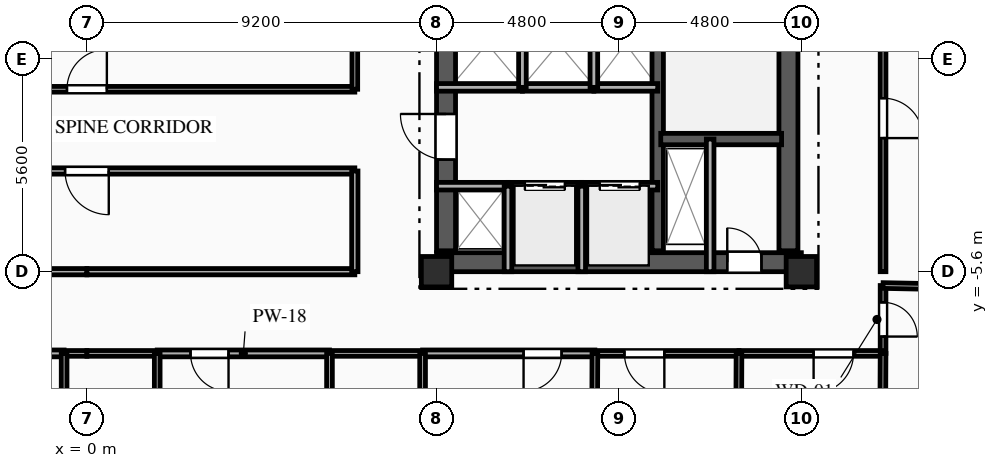
"""IFC4 building model, lengths in metres.
Left out: names, types, materials, properties, quantities, classifications, styles, units other than length and angle.
Written with IfcOpenShell. Run it as: python <this file> out.ifc"""

import sys

from ifc_helpers import new_model, si_unit, direction, frame, frame_2d, origin, origin_2d, place, context, subcontext, project, spatial, rectangle, extrude, element, fill, save


model = new_model("IFC4")
c1 = context("Model", 3, precision=1e-05, world=origin(), true_north=direction((0.0, 1.0)))
c2 = subcontext(c1, "Body", "Model", "MODEL_VIEW")
j1 = project(units=[si_unit("LENGTHUNIT", "METRE"), si_unit("PLANEANGLEUNIT", "RADIAN")], contexts=[c1])
p1 = place(None, origin())
s1 = spatial("IfcSite", under=j1, at=p1, CompositionType="ELEMENT")
p2 = place(p1, origin())
s2 = spatial("IfcBuilding", under=s1, at=p2, CompositionType="ELEMENT")
p3 = place(p2, frame((0.0, 0.0, 209.8)))
s3 = spatial("IfcBuildingStorey", under=s2, at=p3, CompositionType="ELEMENT", Elevation=209.8)
for number, where, z_axis, x_axis in (
    (1, (9.2, -5.6, 0.0), (0.0, 0.0, 1.0), (1.0, 0.0, 0.0)),
    (2, (18.8, -5.6, 0.0), (0.0, 0.0, 1.0), (1.0, 0.0, 0.0)),
):
    element("IfcColumn", number, at=place(p3, frame(where, z_axis=z_axis, x_axis=x_axis)), inside=s3, PredefinedType="COLUMN", context=c2, shape_type="SweptSolid", body=[
        extrude(rectangle(XDim=0.8, YDim=0.8, at=origin_2d()), origin(), (0.0, 0.0, 1.0), 3.35),
    ])
p4 = place(p3, frame((9.2, -5.35, 0.0), z_axis=(0.0, 0.0, 1.0), x_axis=(1.0, 0.0, 0.0)))
e3 = element("IfcWall", 3, at=p4, inside=s3, PredefinedType="SHEAR", context=c2, shape_type="SweptSolid", body=[
    extrude(rectangle(XDim=9.6, YDim=0.5, at=frame_2d((4.8, 0.0))), origin(), (0.0, 0.0, 1.0), 3.04),
])
p5 = place(p4, frame((7.65, 0.0, 0.0)))
e4 = element("IfcOpeningElement", 4, at=p5, cuts=e3, PredefinedType="OPENING", context=c2, shape_type="SweptSolid", body=[
    extrude(rectangle(XDim=0.9, YDim=2.1, at=frame_2d((0.45, 1.05))), frame((0.0, 0.26, 0.0), z_axis=(0.0, -1.0, 0.0), x_axis=(1.0, 0.0, 0.0)), (0.0, 0.0, 1.0), 0.52),
])
p6 = place(p3, frame((9.45, -5.05, 0.0), z_axis=(0.0, 0.0, 1.0), x_axis=(0.0, 1.0, 0.0)))
e5 = element("IfcWall", 5, at=p6, inside=s3, PredefinedType="SHEAR", context=c2, shape_type="SweptSolid", body=[
    extrude(rectangle(XDim=10.1, YDim=0.5, at=frame_2d((5.05, 0.0))), origin(), (0.0, 0.0, 1.0), 3.04),
])
p7 = place(p6, frame((7.15, 0.0, 0.0)))
e6 = element("IfcOpeningElement", 6, at=p7, cuts=e5, PredefinedType="OPENING", context=c2, shape_type="SweptSolid", body=[
    extrude(rectangle(XDim=0.9, YDim=2.1, at=frame_2d((0.45, 1.05))), frame((0.0, 0.26, 0.0), z_axis=(0.0, -1.0, 0.0), x_axis=(1.0, 0.0, 0.0)), (0.0, 0.0, 1.0), 0.52),
])
p8 = place(p6, frame((2.4, 0.0, 0.0)))
e7 = element("IfcOpeningElement", 7, at=p8, cuts=e5, PredefinedType="OPENING", context=c2, shape_type="SweptSolid", body=[
    extrude(rectangle(XDim=1.2, YDim=2.15, at=frame_2d((0.6, 1.075))), frame((0.0, 0.26, 0.0), z_axis=(0.0, -1.0, 0.0), x_axis=(1.0, 0.0, 0.0)), (0.0, 0.0, 1.0), 0.52),
])
p9 = place(p3, frame((18.46, -5.05, 0.0), z_axis=(0.0, 0.0, 1.0), x_axis=(0.0, 1.0, 0.0)))
e8 = element("IfcWall", 8, at=p9, inside=s3, PredefinedType="SHEAR", context=c2, shape_type="SweptSolid", body=[
    extrude(rectangle(XDim=10.1, YDim=0.5, at=frame_2d((5.05, 0.0))), origin(), (0.0, 0.0, 1.0), 3.04),
])
p10 = place(p3, frame((15.02, -5.05, 0.0), z_axis=(0.0, 0.0, 1.0), x_axis=(0.0, 1.0, 0.0)))
e9 = element("IfcWall", 9, at=p10, inside=s3, PredefinedType="SHEAR", context=c2, shape_type="SweptSolid", body=[
    extrude(rectangle(XDim=10.1, YDim=0.3, at=frame_2d((5.05, 0.0))), origin(), (0.0, 0.0, 1.0), 3.04),
])
p11 = place(p3, frame((15.1, -2.11, 0.0), z_axis=(0.0, 0.0, 1.0), x_axis=(1.0, 0.0, 0.0)))
e10 = element("IfcWall", 10, at=p11, inside=s3, PredefinedType="SHEAR", context=c2, shape_type="SweptSolid", body=[
    extrude(rectangle(XDim=3.18, YDim=0.3, at=frame_2d((1.59, 0.0))), origin(), (0.0, 0.0, 1.0), 3.04),
])
p12 = place(p3, frame((16.4, -2.11, 0.0), z_axis=(0.0, 0.0, 1.0), x_axis=(0.0, -1.0, 0.0)))
e11 = element("IfcWall", 11, at=p12, inside=s3, PredefinedType="PARTITIONING", context=c2, shape_type="SweptSolid", body=[
    extrude(rectangle(XDim=3.49, YDim=0.2, at=frame_2d((1.745, 0.0))), origin(), (0.0, 0.0, 1.0), 3.04),
])
p13 = place(p3, frame((9.2, -3.35, 0.0), z_axis=(0.0, 0.0, 1.0), x_axis=(1.0, 0.0, 0.0)))
e12 = element("IfcWall", 12, at=p13, inside=s3, PredefinedType="PARTITIONING", context=c2, shape_type="SweptSolid", body=[
    extrude(rectangle(XDim=1.88, YDim=0.2, at=frame_2d((0.94, 0.0))), origin(), (0.0, 0.0, 1.0), 2.755),
])
p14 = place(p3, frame((11.08, -3.35, 0.0), z_axis=(0.0, 0.0, 1.0), x_axis=(1.0, 0.0, 0.0)))
e13 = element("IfcWall", 13, at=p14, inside=s3, PredefinedType="PARTITIONING", context=c2, shape_type="SweptSolid", body=[
    extrude(rectangle(XDim=1.94, YDim=0.2, at=frame_2d((0.97, 0.0))), origin(), (0.0, 0.0, 1.0), 3.04),
])
p15 = place(p14, frame((0.445, 0.0, 0.0)))
e14 = element("IfcOpeningElement", 14, at=p15, cuts=e13, PredefinedType="OPENING", context=c2, shape_type="SweptSolid", body=[
    extrude(rectangle(XDim=1.05, YDim=2.1, at=frame_2d((0.525, 1.05))), frame((0.0, 0.11, 0.0), z_axis=(0.0, -1.0, 0.0), x_axis=(1.0, 0.0, 0.0)), (0.0, 0.0, 1.0), 0.22),
])
p16 = place(p3, frame((13.02, -3.35, 0.0), z_axis=(0.0, 0.0, 1.0), x_axis=(1.0, 0.0, 0.0)))
e15 = element("IfcWall", 15, at=p16, inside=s3, PredefinedType="PARTITIONING", context=c2, shape_type="SweptSolid", body=[
    extrude(rectangle(XDim=2.0, YDim=0.2, at=frame_2d((1.0, 0.0))), origin(), (0.0, 0.0, 1.0), 3.04),
])
p17 = place(p16, frame((0.475, 0.0, 0.0)))
e16 = element("IfcOpeningElement", 16, at=p17, cuts=e15, PredefinedType="OPENING", context=c2, shape_type="SweptSolid", body=[
    extrude(rectangle(XDim=1.05, YDim=2.1, at=frame_2d((0.525, 1.05))), frame((0.0, 0.11, 0.0), z_axis=(0.0, -1.0, 0.0), x_axis=(1.0, 0.0, 0.0)), (0.0, 0.0, 1.0), 0.22),
])
p18 = place(p3, frame((11.46, -0.75, 0.0), z_axis=(0.0, 0.0, 1.0), x_axis=(-1.0, 0.0, 0.0)))
e17 = element("IfcWall", 17, at=p18, inside=s3, PredefinedType="PARTITIONING", context=c2, shape_type="SweptSolid", body=[
    extrude(rectangle(XDim=2.26, YDim=0.2, at=frame_2d((1.13, 0.0))), origin(), (0.0, 0.0, 1.0), 3.04),
])
p19 = place(p3, frame((13.34, -0.75, 0.0), z_axis=(0.0, 0.0, 1.0), x_axis=(-1.0, 0.0, 0.0)))
e18 = element("IfcWall", 18, at=p19, inside=s3, PredefinedType="PARTITIONING", context=c2, shape_type="SweptSolid", body=[
    extrude(rectangle(XDim=1.88, YDim=0.2, at=frame_2d((0.94, 0.0))), origin(), (0.0, 0.0, 1.0), 3.04),
])
p20 = place(p3, frame((15.02, -0.75, 0.0), z_axis=(0.0, 0.0, 1.0), x_axis=(-1.0, 0.0, 0.0)))
e19 = element("IfcWall", 19, at=p20, inside=s3, PredefinedType="PARTITIONING", context=c2, shape_type="SweptSolid", body=[
    extrude(rectangle(XDim=1.68, YDim=0.2, at=frame_2d((0.84, 0.0))), origin(), (0.0, 0.0, 1.0), 3.04),
])
for number, where, z_axis, x_axis in (
    (20, (11.08, -5.6, 0.0), (0.0, 0.0, 1.0), (0.0, 1.0, 0.0)),
    (21, (13.02, -5.6, 0.0), (0.0, 0.0, 1.0), (0.0, 1.0, 0.0)),
):
    element("IfcWall", number, at=place(p3, frame(where, z_axis=z_axis, x_axis=x_axis)), inside=s3, PredefinedType="PARTITIONING", context=c2, shape_type="SweptSolid", body=[
        extrude(rectangle(XDim=2.25, YDim=0.2, at=frame_2d((1.125, 0.0))), origin(), (0.0, 0.0, 1.0), 3.04),
    ])
for number, where, z_axis, x_axis in (
    (22, (11.46, -0.75, 0.0), (0.0, 0.0, 1.0), (0.0, 1.0, 0.0)),
    (23, (13.34, -0.75, 0.0), (0.0, 0.0, 1.0), (0.0, 1.0, 0.0)),
):
    element("IfcWall", number, at=place(p3, frame(where, z_axis=z_axis, x_axis=x_axis)), inside=s3, PredefinedType="PARTITIONING", context=c2, shape_type="SweptSolid", body=[
        extrude(rectangle(XDim=2.3, YDim=0.2, at=frame_2d((1.15, 0.0))), origin(), (0.0, 0.0, 1.0), 3.04),
    ])
p21 = place(p3, frame((-0.6, -7.75, 0.0), z_axis=(0.0, 0.0, 1.0), x_axis=(-1.0, 0.0, 0.0)))
e24 = element("IfcWall", 24, at=p21, inside=s3, PredefinedType="PARTITIONING", context=c2, shape_type="SweptSolid", body=[
    extrude(rectangle(XDim=4.533, YDim=0.18, at=frame_2d((2.267, 0.0))), origin(), (0.0, 0.0, 1.0), 3.04),
])
p22 = place(p21, frame((0.877, 0.0, 0.0)))
e25 = element("IfcOpeningElement", 25, at=p22, cuts=e24, PredefinedType="OPENING", context=c2, shape_type="SweptSolid", body=[
    extrude(rectangle(XDim=1.0, YDim=2.15, at=frame_2d((0.5, 1.075))), frame((0.0, 0.1, 0.0), z_axis=(0.0, -1.0, 0.0), x_axis=(1.0, 0.0, 0.0)), (0.0, 0.0, 1.0), 0.2),
])
p23 = place(p3, frame((0.0, -7.75, 0.0), z_axis=(0.0, 0.0, 1.0), x_axis=(-1.0, 0.0, 0.0)))
e26 = element("IfcWall", 26, at=p23, inside=s3, PredefinedType="PLUMBINGWALL", context=c2, shape_type="SweptSolid", body=[
    extrude(rectangle(XDim=0.6, YDim=0.15, at=frame_2d((0.3, 0.0))), origin(), (0.0, 0.0, 1.0), 3.04),
])
p24 = place(p3, frame((-7.05, -5.6, 0.0), z_axis=(0.0, 0.0, 1.0), x_axis=(1.0, 0.0, 0.0)))
e27 = element("IfcWall", 27, at=p24, inside=s3, PredefinedType="PARTITIONING", context=c2, shape_type="SweptSolid", body=[
    extrude(rectangle(XDim=7.05, YDim=0.165, at=frame_2d((3.525, 0.0))), origin(), (0.0, 0.0, 1.0), 2.525),
])
p25 = place(p3, frame((20.95, -5.964, 0.0), z_axis=(0.0, 0.0, 1.0), x_axis=(0.0, -1.0, 0.0)))
e28 = element("IfcWall", 28, at=p25, inside=s3, PredefinedType="PARTITIONING", context=c2, shape_type="SweptSolid", body=[
    extrude(rectangle(XDim=1.786, YDim=0.15, at=frame_2d((0.893, 0.0))), origin(), (0.0, 0.0, 1.0), 3.04),
])
p26 = place(p25, frame((0.443, 0.0, 0.0)))
e29 = element("IfcOpeningElement", 29, at=p26, cuts=e28, PredefinedType="OPENING", context=c2, shape_type="SweptSolid", body=[
    extrude(rectangle(XDim=0.9, YDim=2.1, at=frame_2d((0.45, 1.05))), frame((0.0, 0.085, 0.0), z_axis=(0.0, -1.0, 0.0), x_axis=(1.0, 0.0, 0.0)), (0.0, 0.0, 1.0), 0.17),
])
p27 = place(p3, frame((6.383, -7.75, 0.0), z_axis=(0.0, 0.0, 1.0), x_axis=(-1.0, 0.0, 0.0)))
e30 = element("IfcWall", 30, at=p27, inside=s3, PredefinedType="PARTITIONING", context=c2, shape_type="SweptSolid", body=[
    extrude(rectangle(XDim=4.533, YDim=0.18, at=frame_2d((2.267, 0.0))), origin(), (0.0, 0.0, 1.0), 3.04),
])
p28 = place(p27, frame((2.656, 0.0, 0.0)))
e31 = element("IfcOpeningElement", 31, at=p28, cuts=e30, PredefinedType="OPENING", context=c2, shape_type="SweptSolid", body=[
    extrude(rectangle(XDim=1.0, YDim=2.15, at=frame_2d((0.5, 1.075))), frame((0.0, 0.1, 0.0), z_axis=(0.0, -1.0, 0.0), x_axis=(1.0, 0.0, 0.0)), (0.0, 0.0, 1.0), 0.2),
])
p29 = place(p3, frame((1.85, -7.75, 0.0), z_axis=(0.0, 0.0, 1.0), x_axis=(-1.0, 0.0, 0.0)))
e32 = element("IfcWall", 32, at=p29, inside=s3, PredefinedType="PLUMBINGWALL", context=c2, shape_type="SweptSolid", body=[
    extrude(rectangle(XDim=1.85, YDim=0.15, at=frame_2d((0.925, 0.0))), origin(), (0.0, 0.0, 1.0), 3.04),
])
p30 = place(p3, frame((13.367, -7.75, 0.0), z_axis=(0.0, 0.0, 1.0), x_axis=(-1.0, 0.0, 0.0)))
e33 = element("IfcWall", 33, at=p30, inside=s3, PredefinedType="PARTITIONING", context=c2, shape_type="SweptSolid", body=[
    extrude(rectangle(XDim=4.534, YDim=0.18, at=frame_2d((2.267, 0.0))), origin(), (0.0, 0.0, 1.0), 3.04),
])
p31 = place(p30, frame((0.877, 0.0, 0.0)))
e34 = element("IfcOpeningElement", 34, at=p31, cuts=e33, PredefinedType="OPENING", context=c2, shape_type="SweptSolid", body=[
    extrude(rectangle(XDim=1.0, YDim=2.15, at=frame_2d((0.5, 1.075))), frame((0.0, 0.1, 0.0), z_axis=(0.0, -1.0, 0.0), x_axis=(1.0, 0.0, 0.0)), (0.0, 0.0, 1.0), 0.2),
])
p32 = place(p3, frame((8.833, -7.75, 0.0), z_axis=(0.0, 0.0, 1.0), x_axis=(-1.0, 0.0, 0.0)))
e35 = element("IfcWall", 35, at=p32, inside=s3, PredefinedType="PLUMBINGWALL", context=c2, shape_type="SweptSolid", body=[
    extrude(rectangle(XDim=2.45, YDim=0.15, at=frame_2d((1.225, 0.0))), origin(), (0.0, 0.0, 1.0), 3.04),
])
p33 = place(p3, frame((17.158, -7.75, 0.0), z_axis=(0.0, 0.0, 1.0), x_axis=(-1.0, 0.0, 0.0)))
e36 = element("IfcWall", 36, at=p33, inside=s3, PredefinedType="PARTITIONING", context=c2, shape_type="SweptSolid", body=[
    extrude(rectangle(XDim=3.792, YDim=0.15, at=frame_2d((1.896, 0.0))), origin(), (0.0, 0.0, 1.0), 3.04),
])
p34 = place(p33, frame((1.964, 0.0, 0.0)))
e37 = element("IfcOpeningElement", 37, at=p34, cuts=e36, PredefinedType="OPENING", context=c2, shape_type="SweptSolid", body=[
    extrude(rectangle(XDim=1.05, YDim=2.15, at=frame_2d((0.525, 1.075))), frame((0.0, 0.085, 0.0), z_axis=(0.0, -1.0, 0.0), x_axis=(1.0, 0.0, 0.0)), (0.0, 0.0, 1.0), 0.17),
])
p35 = place(p3, frame((20.95, -7.75, 0.0), z_axis=(0.0, 0.0, 1.0), x_axis=(-1.0, 0.0, 0.0)))
e38 = element("IfcWall", 38, at=p35, inside=s3, PredefinedType="PARTITIONING", context=c2, shape_type="SweptSolid", body=[
    extrude(rectangle(XDim=3.792, YDim=0.15, at=frame_2d((1.896, 0.0))), origin(), (0.0, 0.0, 1.0), 3.04),
])
p36 = place(p35, frame((0.778, 0.0, 0.0)))
e39 = element("IfcOpeningElement", 39, at=p36, cuts=e38, PredefinedType="OPENING", context=c2, shape_type="SweptSolid", body=[
    extrude(rectangle(XDim=1.05, YDim=2.15, at=frame_2d((0.525, 1.075))), frame((0.0, 0.085, 0.0), z_axis=(0.0, -1.0, 0.0), x_axis=(1.0, 0.0, 0.0)), (0.0, 0.0, 1.0), 0.17),
])
p37 = place(p3, frame((0.0, -5.6, 0.0), z_axis=(0.0, 0.0, 1.0), x_axis=(1.0, 0.0, 0.0)))
e40 = element("IfcWall", 40, at=p37, inside=s3, PredefinedType="PARTITIONING", context=c2, shape_type="SweptSolid", body=[
    extrude(rectangle(XDim=7.05, YDim=0.165, at=frame_2d((3.525, 0.0))), origin(), (0.0, 0.0, 1.0), 2.525),
])
p38 = place(p3, frame((20.95, 4.438, 0.0), z_axis=(0.0, 0.0, 1.0), x_axis=(0.0, -1.0, 0.0)))
e41 = element("IfcWall", 41, at=p38, inside=s3, PredefinedType="PARTITIONING", context=c2, shape_type="SweptSolid", body=[
    extrude(rectangle(XDim=10.038, YDim=0.15, at=frame_2d((5.019, 0.0))), origin(), (0.0, 0.0, 1.0), 2.695),
])
p39 = place(p38, frame((5.472, 0.0, 0.0)))
e42 = element("IfcOpeningElement", 42, at=p39, cuts=e41, PredefinedType="OPENING", context=c2, shape_type="SweptSolid", body=[
    extrude(rectangle(XDim=1.05, YDim=2.15, at=frame_2d((0.525, 1.075))), frame((0.0, 0.085, 0.0), z_axis=(0.0, -1.0, 0.0), x_axis=(1.0, 0.0, 0.0)), (0.0, 0.0, 1.0), 0.17),
])
p40 = place(p3, frame((-7.05, -0.8, 0.0), z_axis=(0.0, 0.0, 1.0), x_axis=(1.0, 0.0, 0.0)))
e43 = element("IfcWall", 43, at=p40, inside=s3, PredefinedType="PARTITIONING", context=c2, shape_type="SweptSolid", body=[
    extrude(rectangle(XDim=14.1, YDim=0.15, at=frame_2d((7.05, 0.0))), origin(), (0.0, 0.0, 1.0), 3.04),
])
p41 = place(p40, frame((6.525, 0.0, 0.0)))
e44 = element("IfcOpeningElement", 44, at=p41, cuts=e43, PredefinedType="OPENING", context=c2, shape_type="SweptSolid", body=[
    extrude(rectangle(XDim=1.05, YDim=2.15, at=frame_2d((0.525, 1.075))), frame((0.0, 0.085, 0.0), z_axis=(0.0, -1.0, 0.0), x_axis=(1.0, 0.0, 0.0)), (0.0, 0.0, 1.0), 0.17),
])
p42 = place(p3, frame((7.05, -2.95, 0.0), z_axis=(0.0, 0.0, 1.0), x_axis=(-1.0, 0.0, 0.0)))
e45 = element("IfcWall", 45, at=p42, inside=s3, PredefinedType="PARTITIONING", context=c2, shape_type="SweptSolid", body=[
    extrude(rectangle(XDim=14.1, YDim=0.165, at=frame_2d((7.05, 0.0))), origin(), (0.0, 0.0, 1.0), 3.04),
])
p43 = place(p42, frame((6.475, 0.0, 0.0)))
e46 = element("IfcOpeningElement", 46, at=p43, cuts=e45, PredefinedType="OPENING", context=c2, shape_type="SweptSolid", body=[
    extrude(rectangle(XDim=1.15, YDim=2.15, at=frame_2d((0.575, 1.075))), frame((0.0, 0.093, 0.0), z_axis=(0.0, -1.0, 0.0), x_axis=(1.0, 0.0, 0.0)), (0.0, 0.0, 1.0), 0.185),
])
p44 = place(p3, frame((7.05, -0.8, 0.0), z_axis=(0.0, 0.0, 1.0), x_axis=(0.0, 1.0, 0.0)))
e47 = element("IfcWall", 47, at=p44, inside=s3, PredefinedType="PARTITIONING", context=c2, shape_type="SweptSolid", body=[
    extrude(rectangle(XDim=9.3, YDim=0.15, at=frame_2d((4.65, 0.0))), origin(), (0.0, 0.0, 1.0), 3.04),
])
p45 = place(p3, frame((7.05, -5.6, 0.0), z_axis=(0.0, 0.0, 1.0), x_axis=(0.0, 1.0, 0.0)))
e48 = element("IfcWall", 48, at=p45, inside=s3, PredefinedType="PARTITIONING", context=c2, shape_type="SweptSolid", body=[
    extrude(rectangle(XDim=2.65, YDim=0.165, at=frame_2d((1.325, 0.0))), origin(), (0.0, 0.0, 1.0), 3.04),
])
p46 = place(p3, frame((20.95, -5.964, 0.0), z_axis=(0.0, 0.0, 1.0), x_axis=(0.999809784752, -0.019503700029, 0.0)))
e49 = element("IfcWall", 49, at=p46, inside=s3, PredefinedType="PARTITIONING", context=c2, shape_type="SweptSolid", body=[
    extrude(rectangle(XDim=2.241, YDim=0.15, at=frame_2d((1.12, 0.0))), origin(), (0.0, 0.0, 1.0), 3.04),
])
p47 = place(p3, frame((20.906, -16.708, 0.0), z_axis=(0.0, 0.0, 1.0), x_axis=(0.004905642486, 0.999987967264, 0.0)))
e50 = element("IfcWall", 50, at=p47, inside=s3, PredefinedType="PARTITIONING", context=c2, shape_type="SweptSolid", body=[
    extrude(rectangle(XDim=8.958, YDim=0.15, at=frame_2d((4.479, 0.0))), origin(), (0.0, 0.0, 1.0), 2.665),
])
for number, where, z_axis, x_axis in (
    (51, (-0.6, -7.75, 0.0), (0.0, 0.0, 1.0), (0.0, -1.0, 0.0)),
    (52, (1.85, -9.9, 0.0), (0.0, 0.0, 1.0), (0.0, 1.0, 0.0)),
    (53, (6.383, -7.75, 0.0), (0.0, 0.0, 1.0), (0.0, -1.0, 0.0)),
    (54, (8.833, -9.9, 0.0), (0.0, 0.0, 1.0), (0.0, 1.0, 0.0)),
):
    element("IfcWall", number, at=place(p3, frame(where, z_axis=z_axis, x_axis=x_axis)), inside=s3, PredefinedType="PLUMBINGWALL", context=c2, shape_type="SweptSolid", body=[
        extrude(rectangle(XDim=2.15, YDim=0.15, at=frame_2d((1.075, 0.0))), origin(), (0.0, 0.0, 1.0), 3.04),
    ])
p48 = place(p3, frame((13.367, -7.75, 0.0), z_axis=(0.0, 0.0, 1.0), x_axis=(-0.003931559943, -0.999992271388, 0.0)))
e55 = element("IfcWall", 55, at=p48, inside=s3, PredefinedType="PARTITIONING", context=c2, shape_type="SweptSolid", body=[
    extrude(rectangle(XDim=11.177, YDim=0.15, at=frame_2d((5.589, 0.0))), origin(), (0.0, 0.0, 1.0), 3.04),
])
p49 = place(p3, frame((17.158, -7.75, 0.0), z_axis=(0.0, 0.0, 1.0), x_axis=(-0.003796239649, -0.999992794256, 0.0)))
e56 = element("IfcWall", 56, at=p49, inside=s3, PredefinedType="PARTITIONING", context=c2, shape_type="SweptSolid", body=[
    extrude(rectangle(XDim=11.576, YDim=0.15, at=frame_2d((5.788, 0.0))), origin(), (0.0, 0.0, 1.0), 3.04),
])
p50 = place(p5, origin())
e57 = element("IfcDoor", 57, at=p50, inside=s3, OperationType="SINGLE_SWING_LEFT", PredefinedType="DOOR", context=c2, shape_type="SweptSolid", body=[
    extrude(rectangle(XDim=0.9, YDim=2.1, at=frame_2d((0.45, 1.05))), frame((0.0, 0.025, 0.0), z_axis=(0.0, -1.0, 0.0), x_axis=(1.0, 0.0, 0.0)), (0.0, 0.0, 1.0), 0.05),
])
fill(e4, e57)
p51 = place(p15, origin())
e58 = element("IfcDoor", 58, at=p51, inside=s3, OperationType="DOUBLE_DOOR_SLIDING", PredefinedType="DOOR", context=c2, shape_type="SweptSolid", body=[
    extrude(rectangle(XDim=1.05, YDim=2.1, at=frame_2d((0.525, 1.05))), frame((0.0, 0.025, 0.0), z_axis=(0.0, -1.0, 0.0), x_axis=(1.0, 0.0, 0.0)), (0.0, 0.0, 1.0), 0.05),
])
fill(e14, e58)
p52 = place(p17, origin())
e59 = element("IfcDoor", 59, at=p52, inside=s3, OperationType="DOUBLE_DOOR_SLIDING", PredefinedType="DOOR", context=c2, shape_type="SweptSolid", body=[
    extrude(rectangle(XDim=1.05, YDim=2.1, at=frame_2d((0.525, 1.05))), frame((0.0, 0.025, 0.0), z_axis=(0.0, -1.0, 0.0), x_axis=(1.0, 0.0, 0.0)), (0.0, 0.0, 1.0), 0.05),
])
fill(e16, e59)
p53 = place(p8, origin())
e60 = element("IfcDoor", 60, at=p53, inside=s3, OperationType="SINGLE_SWING_RIGHT", PredefinedType="DOOR", context=c2, shape_type="SweptSolid", body=[
    extrude(rectangle(XDim=1.2, YDim=2.15, at=frame_2d((0.6, 1.075))), frame((0.0, 0.025, 0.0), z_axis=(0.0, -1.0, 0.0), x_axis=(1.0, 0.0, 0.0)), (0.0, 0.0, 1.0), 0.05),
])
fill(e7, e60)
p54 = place(p26, origin())
e61 = element("IfcDoor", 61, at=p54, inside=s3, OperationType="SINGLE_SWING_RIGHT", PredefinedType="DOOR", context=c2, shape_type="SweptSolid", body=[
    extrude(rectangle(XDim=0.9, YDim=2.1, at=frame_2d((0.45, 1.05))), frame((0.0, 0.025, 0.0), z_axis=(0.0, -1.0, 0.0), x_axis=(1.0, 0.0, 0.0)), (0.0, 0.0, 1.0), 0.05),
])
fill(e29, e61)
p55 = place(p28, origin())
e62 = element("IfcDoor", 62, at=p55, inside=s3, OperationType="SINGLE_SWING_LEFT", PredefinedType="DOOR", context=c2, shape_type="SweptSolid", body=[
    extrude(rectangle(XDim=1.0, YDim=2.15, at=frame_2d((0.5, 1.075))), frame((0.0, 0.025, 0.0), z_axis=(0.0, -1.0, 0.0), x_axis=(1.0, 0.0, 0.0)), (0.0, 0.0, 1.0), 0.05),
])
fill(e31, e62)
p56 = place(p31, origin())
e63 = element("IfcDoor", 63, at=p56, inside=s3, OperationType="SINGLE_SWING_RIGHT", PredefinedType="DOOR", context=c2, shape_type="SweptSolid", body=[
    extrude(rectangle(XDim=1.0, YDim=2.15, at=frame_2d((0.5, 1.075))), frame((0.0, 0.025, 0.0), z_axis=(0.0, -1.0, 0.0), x_axis=(1.0, 0.0, 0.0)), (0.0, 0.0, 1.0), 0.05),
])
fill(e34, e63)
p57 = place(p34, origin())
e64 = element("IfcDoor", 64, at=p57, inside=s3, OperationType="SINGLE_SWING_LEFT", PredefinedType="DOOR", context=c2, shape_type="SweptSolid", body=[
    extrude(rectangle(XDim=1.05, YDim=2.15, at=frame_2d((0.525, 1.075))), frame((0.0, 0.025, 0.0), z_axis=(0.0, -1.0, 0.0), x_axis=(1.0, 0.0, 0.0)), (0.0, 0.0, 1.0), 0.05),
])
fill(e37, e64)
p58 = place(p36, origin())
e65 = element("IfcDoor", 65, at=p58, inside=s3, OperationType="SINGLE_SWING_RIGHT", PredefinedType="DOOR", context=c2, shape_type="SweptSolid", body=[
    extrude(rectangle(XDim=1.05, YDim=2.15, at=frame_2d((0.525, 1.075))), frame((0.0, 0.025, 0.0), z_axis=(0.0, -1.0, 0.0), x_axis=(1.0, 0.0, 0.0)), (0.0, 0.0, 1.0), 0.05),
])
fill(e39, e65)
p59 = place(p39, origin())
e66 = element("IfcDoor", 66, at=p59, inside=s3, OperationType="SINGLE_SWING_RIGHT", PredefinedType="DOOR", context=c2, shape_type="SweptSolid", body=[
    extrude(rectangle(XDim=1.05, YDim=2.15, at=frame_2d((0.525, 1.075))), frame((0.0, 0.025, 0.0), z_axis=(0.0, -1.0, 0.0), x_axis=(1.0, 0.0, 0.0)), (0.0, 0.0, 1.0), 0.05),
])
fill(e42, e66)
p60 = place(p41, origin())
e67 = element("IfcDoor", 67, at=p60, inside=s3, OperationType="SINGLE_SWING_RIGHT", PredefinedType="DOOR", context=c2, shape_type="SweptSolid", body=[
    extrude(rectangle(XDim=1.05, YDim=2.15, at=frame_2d((0.525, 1.075))), frame((0.0, 0.025, 0.0), z_axis=(0.0, -1.0, 0.0), x_axis=(1.0, 0.0, 0.0)), (0.0, 0.0, 1.0), 0.05),
])
fill(e44, e67)
p61 = place(p43, origin())
e68 = element("IfcDoor", 68, at=p61, inside=s3, OperationType="SINGLE_SWING_LEFT", PredefinedType="DOOR", context=c2, shape_type="SweptSolid", body=[
    extrude(rectangle(XDim=1.15, YDim=2.15, at=frame_2d((0.575, 1.075))), frame((0.0, 0.025, 0.0), z_axis=(0.0, -1.0, 0.0), x_axis=(1.0, 0.0, 0.0)), (0.0, 0.0, 1.0), 0.05),
])
fill(e46, e68)
save(model, sys.argv[1])
